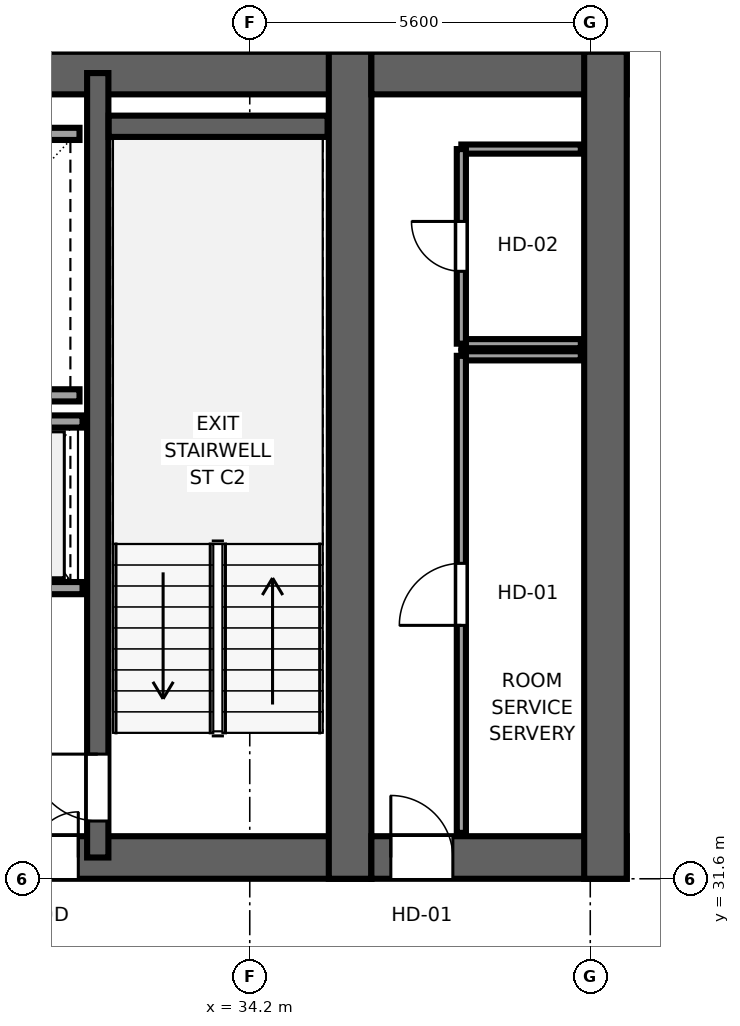
"""IFC4 building model, lengths in metres.
Left out: names, types, materials, properties, quantities, classifications, styles, units other than length and angle.
Written with IfcOpenShell. Run it as: python <this file> out.ifc"""

import sys

from ifc_helpers import new_model, si_unit, direction, frame, frame_2d, origin, place, context, subcontext, project, spatial, rectangle, extrude, source, transform, mapped, element, fill, save


model = new_model("IFC4")
c1 = context("Model", 3, precision=1e-05, world=origin(), true_north=direction((0.0, 1.0)))
c2 = subcontext(c1, "Body", "Model", "MODEL_VIEW")
j1 = project(units=[si_unit("LENGTHUNIT", "METRE"), si_unit("PLANEANGLEUNIT", "RADIAN")], contexts=[c1])
p1 = place(None, origin())
s1 = spatial("IfcSite", under=j1, at=p1, CompositionType="ELEMENT")
p2 = place(p1, origin())
s2 = spatial("IfcBuilding", under=s1, at=p2, CompositionType="ELEMENT")
p3 = place(p2, frame((0.0, 0.0, 157.7)))
s3 = spatial("IfcBuildingStorey", under=s2, at=p3, CompositionType="ELEMENT", Elevation=157.7)
p4 = place(p3, frame((9.8, 31.95, 0.0), z_axis=(0.0, 0.0, 1.0), x_axis=(1.0, 0.0, 0.0)))
e1 = element("IfcWall", 1, at=p4, inside=s3, PredefinedType="SHEAR", context=c2, shape_type="SweptSolid", body=[
    extrude(rectangle(XDim=26.4, YDim=0.7, at=frame_2d((13.2, 0.0))), origin(), (0.0, 0.0, 1.0), 3.55),
])
p5 = place(p4, frame((6.32, 0.0, 0.0), z_axis=(0.0, 0.0, 1.0), x_axis=(-1.0, 0.0, 0.0)))
e2 = element("IfcOpeningElement", 2, at=p5, cuts=e1, PredefinedType="OPENING", context=c2, shape_type="SweptSolid", body=[
    extrude(rectangle(XDim=1.5, YDim=2.04, at=frame_2d((0.75, 1.02))), frame((0.0, 0.36, 0.0), z_axis=(0.0, -1.0, 0.0), x_axis=(1.0, 0.0, 0.0)), (0.0, 0.0, 1.0), 0.72),
])
p6 = place(p4, frame((13.95, 0.0, 0.0), z_axis=(0.0, 0.0, 1.0), x_axis=(-1.0, 0.0, 0.0)))
e3 = element("IfcOpeningElement", 3, at=p6, cuts=e1, PredefinedType="OPENING", context=c2, shape_type="SweptSolid", body=[
    extrude(rectangle(XDim=1.5, YDim=2.04, at=frame_2d((0.75, 1.02))), frame((0.0, 0.36, 0.0), z_axis=(0.0, -1.0, 0.0), x_axis=(1.0, 0.0, 0.0)), (0.0, 0.0, 1.0), 0.72),
])
p7 = place(p4, frame((21.58, 0.0, 0.0), z_axis=(0.0, 0.0, 1.0), x_axis=(-1.0, 0.0, 0.0)))
e4 = element("IfcOpeningElement", 4, at=p7, cuts=e1, PredefinedType="OPENING", context=c2, shape_type="SweptSolid", body=[
    extrude(rectangle(XDim=1.5, YDim=2.04, at=frame_2d((0.75, 1.02))), frame((0.0, 0.36, 0.0), z_axis=(0.0, -1.0, 0.0), x_axis=(1.0, 0.0, 0.0)), (0.0, 0.0, 1.0), 0.72),
])
p8 = place(p4, frame((8.37, 0.0, 0.0), z_axis=(0.0, 0.0, 1.0), x_axis=(-1.0, 0.0, 0.0)))
e5 = element("IfcOpeningElement", 5, at=p8, cuts=e1, PredefinedType="OPENING", context=c2, shape_type="SweptSolid", body=[
    extrude(rectangle(XDim=0.82, YDim=2.01, at=frame_2d((0.41, 1.005))), frame((0.0, 0.36, 0.0), z_axis=(0.0, -1.0, 0.0), x_axis=(1.0, 0.0, 0.0)), (0.0, 0.0, 1.0), 0.72),
])
p9 = place(p4, frame((18.87, 0.0, 0.0), z_axis=(0.0, 0.0, 1.0), x_axis=(-1.0, 0.0, 0.0)))
e6 = element("IfcOpeningElement", 6, at=p9, cuts=e1, PredefinedType="OPENING", context=c2, shape_type="SweptSolid", body=[
    extrude(rectangle(XDim=0.82, YDim=2.01, at=frame_2d((0.41, 1.005))), frame((0.0, 0.36, 0.0), z_axis=(0.0, -1.0, 0.0), x_axis=(1.0, 0.0, 0.0)), (0.0, 0.0, 1.0), 0.72),
])
p10 = place(p3, frame((9.8, 44.85, 0.0), z_axis=(0.0, 0.0, 1.0), x_axis=(1.0, 0.0, 0.0)))
e7 = element("IfcWall", 7, at=p10, inside=s3, PredefinedType="SHEAR", context=c2, shape_type="SweptSolid", body=[
    extrude(rectangle(XDim=26.4, YDim=0.7, at=frame_2d((13.2, 0.0))), origin(), (0.0, 0.0, 1.0), 3.55),
])
p11 = place(p3, frame((35.85, 31.6, 0.0), z_axis=(0.0, 0.0, 1.0), x_axis=(0.0, 1.0, 0.0)))
e8 = element("IfcWall", 8, at=p11, inside=s3, PredefinedType="SHEAR", context=c2, shape_type="SweptSolid", body=[
    extrude(rectangle(XDim=13.6, YDim=0.7, at=frame_2d((6.8, 0.0))), origin(), (0.0, 0.0, 1.0), 3.55),
])
p12 = place(p3, frame((31.7, 31.95, 0.0), z_axis=(0.0, 0.0, 1.0), x_axis=(0.0, 1.0, 0.0)))
e9 = element("IfcWall", 9, at=p12, inside=s3, PredefinedType="SHEAR", context=c2, shape_type="SweptSolid", body=[
    extrude(rectangle(XDim=12.9, YDim=0.35, at=frame_2d((6.45, 0.0))), origin(), (0.0, 0.0, 1.0), 3.55),
])
p13 = place(p12, frame((1.7, 0.0, 0.0), z_axis=(0.0, 0.0, 1.0), x_axis=(-1.0, 0.0, 0.0)))
e10 = element("IfcOpeningElement", 10, at=p13, cuts=e9, PredefinedType="OPENING", context=c2, shape_type="SweptSolid", body=[
    extrude(rectangle(XDim=1.1, YDim=2.12, at=frame_2d((0.55, 1.06))), frame((0.0, 0.185, 0.0), z_axis=(0.0, -1.0, 0.0), x_axis=(1.0, 0.0, 0.0)), (0.0, 0.0, 1.0), 0.37),
])
p14 = place(p3, frame((36.2, 31.95, 0.0), z_axis=(0.0, 0.0, 1.0), x_axis=(1.0, 0.0, 0.0)))
e11 = element("IfcWall", 11, at=p14, inside=s3, PredefinedType="SHEAR", context=c2, shape_type="SweptSolid", body=[
    extrude(rectangle(XDim=4.2, YDim=0.7, at=frame_2d((2.1, 0.0))), origin(), (0.0, 0.0, 1.0), 3.55),
])
p15 = place(p14, frame((1.34, 0.0, 0.0), z_axis=(0.0, 0.0, 1.0), x_axis=(-1.0, 0.0, 0.0)))
e12 = element("IfcOpeningElement", 12, at=p15, cuts=e11, PredefinedType="OPENING", context=c2, shape_type="SweptSolid", body=[
    extrude(rectangle(XDim=1.02, YDim=2.03, at=frame_2d((0.51, 1.015))), frame((0.0, 0.36, 0.0), z_axis=(0.0, -1.0, 0.0), x_axis=(1.0, 0.0, 0.0)), (0.0, 0.0, 1.0), 0.72),
])
p16 = place(p3, frame((36.2, 44.85, 0.0), z_axis=(0.0, 0.0, 1.0), x_axis=(1.0, 0.0, 0.0)))
e13 = element("IfcWall", 13, at=p16, inside=s3, PredefinedType="SHEAR", context=c2, shape_type="SweptSolid", body=[
    extrude(rectangle(XDim=4.2, YDim=0.7, at=frame_2d((2.1, 0.0))), origin(), (0.0, 0.0, 1.0), 3.55),
])
p17 = place(p3, frame((40.05, 31.6, 0.0), z_axis=(0.0, 0.0, 1.0), x_axis=(0.0, 1.0, 0.0)))
e14 = element("IfcWall", 14, at=p17, inside=s3, PredefinedType="SHEAR", context=c2, shape_type="SweptSolid", body=[
    extrude(rectangle(XDim=13.6, YDim=0.7, at=frame_2d((6.8, 0.0))), origin(), (0.0, 0.0, 1.0), 3.55),
])
p18 = place(p3, frame((31.88, 43.975, 0.0), z_axis=(0.0, 0.0, 1.0), x_axis=(1.0, 0.0, 0.0)))
e15 = element("IfcWall", 15, at=p18, inside=s3, PredefinedType="SHEAR", context=c2, shape_type="SweptSolid", body=[
    extrude(rectangle(XDim=3.6, YDim=0.35, at=frame_2d((1.8, 0.0))), origin(), (0.0, 0.0, 1.0), 3.55),
])
for number, where, z_axis, x_axis in (
    (16, (27.3, 39.55, 0.0), (0.0, 0.0, 1.0), (1.0, 0.0, 0.0)),
    (17, (27.3, 43.85, 0.0), (0.0, 0.0, 1.0), (1.0, 0.0, 0.0)),
):
    element("IfcWall", number, at=place(p3, frame(where, z_axis=z_axis, x_axis=x_axis)), inside=s3, PredefinedType="SOLIDWALL", context=c2, shape_type="SweptSolid", body=[
        extrude(rectangle(XDim=4.1, YDim=0.2, at=frame_2d((2.05, 0.0))), origin(), (0.0, 0.0, 1.0), 3.37),
    ])
p19 = place(p3, frame((27.375, 36.38, 0.0), z_axis=(0.0, 0.0, 1.0), x_axis=(1.0, 0.0, 0.0)))
e18 = element("IfcWall", 18, at=p19, inside=s3, PredefinedType="SOLIDWALL", context=c2, shape_type="SweptSolid", body=[
    extrude(rectangle(XDim=4.075, YDim=0.2, at=frame_2d((2.038, 0.0))), origin(), (0.0, 0.0, 1.0), 3.37),
])
p20 = place(p19, frame((0.525, 0.0, 0.0)))
e19 = element("IfcOpeningElement", 19, at=p20, cuts=e18, PredefinedType="OPENING", context=c2, shape_type="SweptSolid", body=[
    extrude(rectangle(XDim=1.1, YDim=2.12, at=frame_2d((0.55, 1.06))), frame((0.0, 0.11, 0.0), z_axis=(0.0, -1.0, 0.0), x_axis=(1.0, 0.0, 0.0)), (0.0, 0.0, 1.0), 0.22),
])
p21 = place(p19, frame((2.425, 0.0, 0.0)))
e20 = element("IfcOpeningElement", 20, at=p21, cuts=e18, PredefinedType="OPENING", context=c2, shape_type="SweptSolid", body=[
    extrude(rectangle(XDim=1.1, YDim=2.12, at=frame_2d((0.55, 1.06))), frame((0.0, 0.11, 0.0), z_axis=(0.0, -1.0, 0.0), x_axis=(1.0, 0.0, 0.0)), (0.0, 0.0, 1.0), 0.22),
])
p22 = place(p3, frame((27.375, 39.12, 0.0), z_axis=(0.0, 0.0, 1.0), x_axis=(1.0, 0.0, 0.0)))
e21 = element("IfcWall", 21, at=p22, inside=s3, PredefinedType="SOLIDWALL", context=c2, shape_type="SweptSolid", body=[
    extrude(rectangle(XDim=4.075, YDim=0.2, at=frame_2d((2.038, 0.0))), origin(), (0.0, 0.0, 1.0), 3.37),
])
p23 = place(p3, frame((37.68, 40.2, 0.0), z_axis=(0.0, 0.0, 1.0), x_axis=(1.0, 0.0, 0.0)))
e22 = element("IfcWall", 22, at=p23, inside=s3, PredefinedType="PARTITIONING", context=c2, shape_type="SweptSolid", body=[
    extrude(rectangle(XDim=1.965, YDim=0.15, at=frame_2d((0.982, 0.0))), origin(), (0.0, 0.0, 1.0), 3.37),
])
p24 = place(p3, frame((37.68, 32.355, 0.0), z_axis=(0.0, 0.0, 1.0), x_axis=(0.0, 1.0, 0.0)))
e23 = element("IfcWall", 23, at=p24, inside=s3, PredefinedType="PARTITIONING", context=c2, shape_type="SweptSolid", body=[
    extrude(rectangle(XDim=7.845, YDim=0.15, at=frame_2d((3.922, 0.0))), origin(), (0.0, 0.0, 1.0), 3.37),
])
p25 = place(p24, frame((3.413, 0.0, 0.0)))
e24 = element("IfcOpeningElement", 24, at=p25, cuts=e23, PredefinedType="OPENING", context=c2, shape_type="SweptSolid", body=[
    extrude(rectangle(XDim=1.02, YDim=2.03, at=frame_2d((0.51, 1.015))), frame((0.0, 0.085, 0.0), z_axis=(0.0, -1.0, 0.0), x_axis=(1.0, 0.0, 0.0)), (0.0, 0.0, 1.0), 0.17),
])
for number, where, z_axis, x_axis in (
    (25, (37.68, 40.4, 0.0), (0.0, 0.0, 1.0), (1.0, 0.0, 0.0)),
    (26, (37.68, 43.6, 0.0), (0.0, 0.0, 1.0), (1.0, 0.0, 0.0)),
):
    element("IfcWall", number, at=place(p3, frame(where, z_axis=z_axis, x_axis=x_axis)), inside=s3, PredefinedType="PARTITIONING", context=c2, shape_type="SweptSolid", body=[
        extrude(rectangle(XDim=1.965, YDim=0.15, at=frame_2d((0.982, 0.0))), origin(), (0.0, 0.0, 1.0), 3.37),
    ])
p26 = place(p3, frame((37.68, 40.4, 0.0), z_axis=(0.0, 0.0, 1.0), x_axis=(0.0, 1.0, 0.0)))
e27 = element("IfcWall", 27, at=p26, inside=s3, PredefinedType="PARTITIONING", context=c2, shape_type="SweptSolid", body=[
    extrude(rectangle(XDim=3.2, YDim=0.15, at=frame_2d((1.6, 0.0))), origin(), (0.0, 0.0, 1.0), 3.37),
])
p27 = place(p26, frame((1.19, 0.0, 0.0)))
e28 = element("IfcOpeningElement", 28, at=p27, cuts=e27, PredefinedType="OPENING", context=c2, shape_type="SweptSolid", body=[
    extrude(rectangle(XDim=0.82, YDim=2.01, at=frame_2d((0.41, 1.005))), frame((0.0, 0.085, 0.0), z_axis=(0.0, -1.0, 0.0), x_axis=(1.0, 0.0, 0.0)), (0.0, 0.0, 1.0), 0.17),
])
m1 = source(origin(), c2, "Body", "SweptSolid", [
    extrude(rectangle(XDim=1.1, YDim=2.12, at=frame_2d((0.55, 1.06))), frame((0.0, 0.025, 0.0), z_axis=(0.0, -1.0, 0.0), x_axis=(1.0, 0.0, 0.0)), (0.0, 0.0, 1.0), 0.05),
])
p28 = place(p13, origin())
e29 = element("IfcDoor", 29, at=p28, inside=s3, OperationType="SINGLE_SWING_RIGHT", PredefinedType="DOOR", context=c2, shape_type="MappedRepresentation", body=[
    mapped(m1, transform((0.0, 0.0, 0.0), x_axis=(1.0, 0.0, 0.0), y_axis=(0.0, 1.0, 0.0), z_axis=(0.0, 0.0, 1.0), scale=1.0)),
])
fill(e10, e29)
m2 = source(origin(), c2, "Body", "SweptSolid", [
    extrude(rectangle(XDim=1.5, YDim=2.04, at=frame_2d((0.75, 1.02))), frame((0.0, 0.025, 0.0), z_axis=(0.0, -1.0, 0.0), x_axis=(1.0, 0.0, 0.0)), (0.0, 0.0, 1.0), 0.05),
])
p29 = place(p7, origin())
e30 = element("IfcDoor", 30, at=p29, inside=s3, OperationType="DOUBLE_DOOR_SINGLE_SWING", PredefinedType="DOOR", context=c2, shape_type="MappedRepresentation", body=[
    mapped(m2, transform((0.0, 0.0, 0.0), x_axis=(1.0, 0.0, 0.0), y_axis=(0.0, 1.0, 0.0), z_axis=(0.0, 0.0, 1.0), scale=1.0)),
])
fill(e4, e30)
m3 = source(origin(), c2, "Body", "SweptSolid", [
    extrude(rectangle(XDim=1.02, YDim=2.03, at=frame_2d((0.51, 1.015))), frame((0.0, 0.025, 0.0), z_axis=(0.0, -1.0, 0.0), x_axis=(1.0, 0.0, 0.0)), (0.0, 0.0, 1.0), 0.05),
])
p30 = place(p15, origin())
e31 = element("IfcDoor", 31, at=p30, inside=s3, OperationType="SINGLE_SWING_LEFT", PredefinedType="DOOR", context=c2, shape_type="MappedRepresentation", body=[
    mapped(m3, transform((0.0, 0.0, 0.0), x_axis=(1.0, 0.0, 0.0), y_axis=(0.0, 1.0, 0.0), z_axis=(0.0, 0.0, 1.0), scale=1.0)),
])
fill(e12, e31)
p31 = place(p25, origin())
e32 = element("IfcDoor", 32, at=p31, inside=s3, OperationType="SINGLE_SWING_LEFT", PredefinedType="DOOR", context=c2, shape_type="MappedRepresentation", body=[
    mapped(m3, transform((0.0, 0.0, 0.0), x_axis=(1.0, 0.0, 0.0), y_axis=(0.0, 1.0, 0.0), z_axis=(0.0, 0.0, 1.0), scale=1.0)),
])
fill(e24, e32)
m4 = source(origin(), c2, "Body", "SweptSolid", [
    extrude(rectangle(XDim=0.82, YDim=2.01, at=frame_2d((0.41, 1.005))), frame((0.0, 0.025, 0.0), z_axis=(0.0, -1.0, 0.0), x_axis=(1.0, 0.0, 0.0)), (0.0, 0.0, 1.0), 0.05),
])
p32 = place(p27, origin())
e33 = element("IfcDoor", 33, at=p32, inside=s3, OperationType="SINGLE_SWING_RIGHT", PredefinedType="DOOR", context=c2, shape_type="MappedRepresentation", body=[
    mapped(m4, transform((0.0, 0.0, 0.0), x_axis=(1.0, 0.0, 0.0), y_axis=(0.0, 1.0, 0.0), z_axis=(0.0, 0.0, 1.0), scale=1.0)),
])
fill(e28, e33)
save(model, sys.argv[1])
